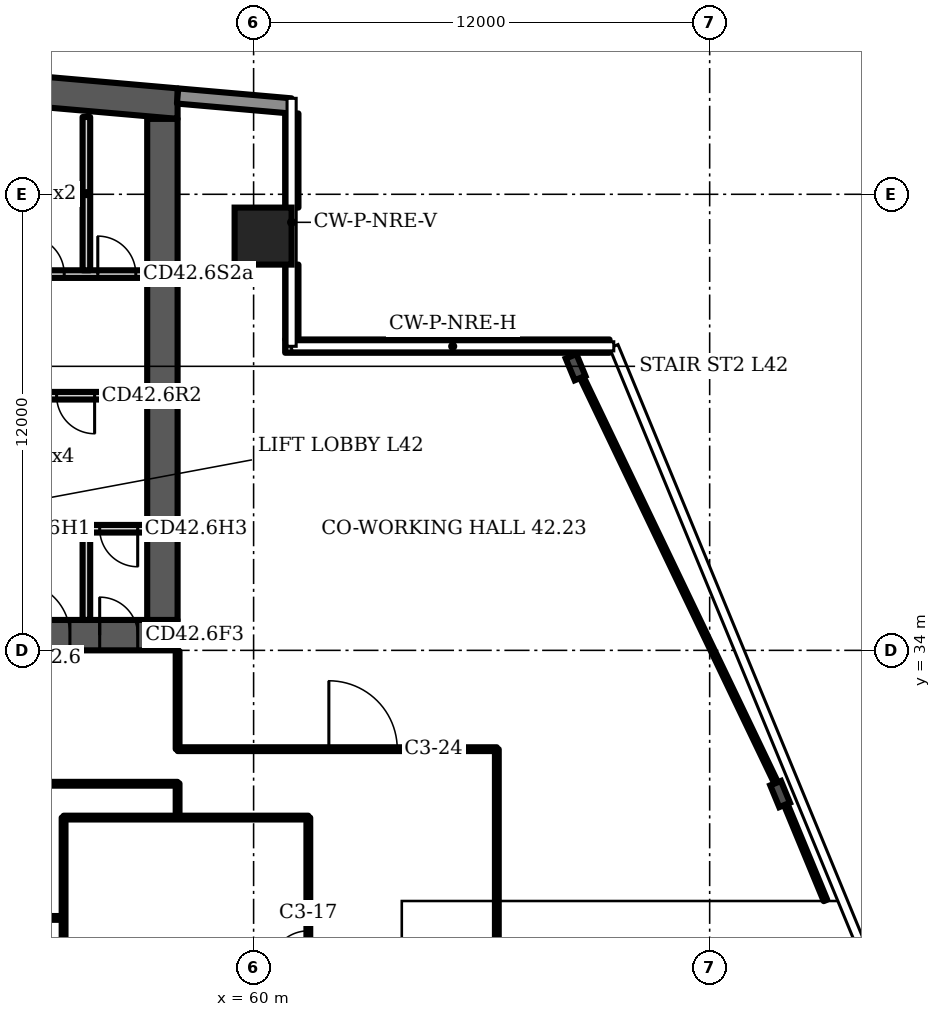
"""IFC4 building model, lengths in metres.
Left out: names, types, materials, properties, quantities, classifications, styles, units other than length and angle.
Written with IfcOpenShell. Run it as: python <this file> out.ifc"""

import sys

from ifc_helpers import new_model, si_unit, direction, frame, frame_2d, origin, origin_2d, place, context, subcontext, project, spatial, polyline, rectangle, i_section, outline, extrude, element, fill, save


model = new_model("IFC4")
c1 = context("Model", 3, precision=1e-05, world=origin(), true_north=direction((0.0, 1.0)))
c2 = subcontext(c1, "Body", "Model", "MODEL_VIEW")
j1 = project(units=[si_unit("LENGTHUNIT", "METRE"), si_unit("PLANEANGLEUNIT", "RADIAN")], contexts=[c1])
p1 = place(None, origin())
s1 = spatial("IfcSite", under=j1, at=p1, CompositionType="ELEMENT")
p2 = place(p1, origin())
s2 = spatial("IfcBuilding", under=s1, at=p2, CompositionType="ELEMENT")
p3 = place(p2, frame((0.0, 0.0, 173.5)))
s3 = spatial("IfcBuildingStorey", under=s2, at=p3, CompositionType="ELEMENT", Elevation=173.5)
p4 = place(p3, origin())
e1 = element("IfcWall", 1, at=p4, inside=s3, PredefinedType="SHEAR", context=c2, shape_type="SweptSolid", body=[
    extrude(outline(polyline([(16.0, 47.984), (37.0, 49.822), (58.0, 47.984), (58.0, 48.787), (37.0, 50.625), (16.0, 48.787), (16.0, 47.984)])), origin(), (0.0, 0.0, 1.0), 3.6),
])
p5 = place(p3, frame((16.0, 34.4, 0.0), z_axis=(0.0, 0.0, 1.0), x_axis=(1.0, 0.0, 0.0)))
e2 = element("IfcWall", 2, at=p5, inside=s3, PredefinedType="SHEAR", context=c2, shape_type="SweptSolid", body=[
    extrude(rectangle(XDim=42.0, YDim=0.8, at=frame_2d((21.0, 0.0))), origin(), (0.0, 0.0, 1.0), 3.6),
])
p6 = place(p5, frame((3.2, 0.0, 0.0)))
e3 = element("IfcOpeningElement", 3, at=p6, cuts=e2, PredefinedType="OPENING", context=c2, shape_type="SweptSolid", body=[
    extrude(rectangle(XDim=1.0, YDim=2.1, at=frame_2d((0.5, 1.05))), frame((0.0, 0.41, 0.0), z_axis=(0.0, -1.0, 0.0), x_axis=(1.0, 0.0, 0.0)), (0.0, 0.0, 1.0), 0.82),
])
p7 = place(p5, frame((7.65, 0.0, 0.0)))
e4 = element("IfcOpeningElement", 4, at=p7, cuts=e2, PredefinedType="OPENING", context=c2, shape_type="SweptSolid", body=[
    extrude(rectangle(XDim=1.2, YDim=2.1, at=frame_2d((0.6, 1.05))), frame((0.0, 0.41, 0.0), z_axis=(0.0, -1.0, 0.0), x_axis=(1.0, 0.0, 0.0)), (0.0, 0.0, 1.0), 0.82),
])
p8 = place(p5, frame((14.767, 0.0, 0.0)))
e5 = element("IfcOpeningElement", 5, at=p8, cuts=e2, PredefinedType="OPENING", context=c2, shape_type="SweptSolid", body=[
    extrude(rectangle(XDim=1.1, YDim=2.1, at=frame_2d((0.55, 1.05))), frame((0.0, 0.41, 0.0), z_axis=(0.0, -1.0, 0.0), x_axis=(1.0, 0.0, 0.0)), (0.0, 0.0, 1.0), 0.82),
])
p9 = place(p5, frame((19.133, 0.0, 0.0)))
e6 = element("IfcOpeningElement", 6, at=p9, cuts=e2, PredefinedType="OPENING", context=c2, shape_type="SweptSolid", body=[
    extrude(rectangle(XDim=1.1, YDim=2.1, at=frame_2d((0.55, 1.05))), frame((0.0, 0.41, 0.0), z_axis=(0.0, -1.0, 0.0), x_axis=(1.0, 0.0, 0.0)), (0.0, 0.0, 1.0), 0.82),
])
p10 = place(p5, frame((16.8, 0.0, 0.0)))
e7 = element("IfcOpeningElement", 7, at=p10, cuts=e2, PredefinedType="OPENING", context=c2, shape_type="SweptSolid", body=[
    extrude(rectangle(XDim=1.4, YDim=2.1, at=frame_2d((0.7, 1.05))), frame((0.0, 0.41, 0.0), z_axis=(0.0, -1.0, 0.0), x_axis=(1.0, 0.0, 0.0)), (0.0, 0.0, 1.0), 0.82),
])
p11 = place(p5, frame((21.767, 0.0, 0.0)))
e8 = element("IfcOpeningElement", 8, at=p11, cuts=e2, PredefinedType="OPENING", context=c2, shape_type="SweptSolid", body=[
    extrude(rectangle(XDim=1.1, YDim=2.1, at=frame_2d((0.55, 1.05))), frame((0.0, 0.41, 0.0), z_axis=(0.0, -1.0, 0.0), x_axis=(1.0, 0.0, 0.0)), (0.0, 0.0, 1.0), 0.82),
])
p12 = place(p5, frame((23.95, 0.0, 0.0)))
e9 = element("IfcOpeningElement", 9, at=p12, cuts=e2, PredefinedType="OPENING", context=c2, shape_type="SweptSolid", body=[
    extrude(rectangle(XDim=1.1, YDim=2.1, at=frame_2d((0.55, 1.05))), frame((0.0, 0.41, 0.0), z_axis=(0.0, -1.0, 0.0), x_axis=(1.0, 0.0, 0.0)), (0.0, 0.0, 1.0), 0.82),
])
p13 = place(p5, frame((26.133, 0.0, 0.0)))
e10 = element("IfcOpeningElement", 10, at=p13, cuts=e2, PredefinedType="OPENING", context=c2, shape_type="SweptSolid", body=[
    extrude(rectangle(XDim=1.1, YDim=2.1, at=frame_2d((0.55, 1.05))), frame((0.0, 0.41, 0.0), z_axis=(0.0, -1.0, 0.0), x_axis=(1.0, 0.0, 0.0)), (0.0, 0.0, 1.0), 0.82),
])
p14 = place(p5, frame((33.15, 0.0, 0.0)))
e11 = element("IfcOpeningElement", 11, at=p14, cuts=e2, PredefinedType="OPENING", context=c2, shape_type="SweptSolid", body=[
    extrude(rectangle(XDim=1.2, YDim=2.1, at=frame_2d((0.6, 1.05))), frame((0.0, 0.41, 0.0), z_axis=(0.0, -1.0, 0.0), x_axis=(1.0, 0.0, 0.0)), (0.0, 0.0, 1.0), 0.82),
])
p15 = place(p5, frame((35.817, 0.0, 0.0)))
e12 = element("IfcOpeningElement", 12, at=p15, cuts=e2, PredefinedType="OPENING", context=c2, shape_type="SweptSolid", body=[
    extrude(rectangle(XDim=1.0, YDim=2.1, at=frame_2d((0.5, 1.05))), frame((0.0, 0.41, 0.0), z_axis=(0.0, -1.0, 0.0), x_axis=(1.0, 0.0, 0.0)), (0.0, 0.0, 1.0), 0.82),
])
p16 = place(p5, frame((39.95, 0.0, 0.0)))
e13 = element("IfcOpeningElement", 13, at=p16, cuts=e2, PredefinedType="OPENING", context=c2, shape_type="SweptSolid", body=[
    extrude(rectangle(XDim=1.0, YDim=2.1, at=frame_2d((0.5, 1.05))), frame((0.0, 0.41, 0.0), z_axis=(0.0, -1.0, 0.0), x_axis=(1.0, 0.0, 0.0)), (0.0, 0.0, 1.0), 0.82),
])
p17 = place(p5, frame((37.767, 0.0, 0.0)))
e14 = element("IfcOpeningElement", 14, at=p17, cuts=e2, PredefinedType="OPENING", context=c2, shape_type="SweptSolid", body=[
    extrude(rectangle(XDim=1.4, YDim=2.1, at=frame_2d((0.7, 1.05))), frame((0.0, 0.41, 0.0), z_axis=(0.0, -1.0, 0.0), x_axis=(1.0, 0.0, 0.0)), (0.0, 0.0, 1.0), 0.82),
])
p18 = place(p3, frame((57.6, 34.8, 0.0), z_axis=(0.0, 0.0, 1.0), x_axis=(0.0, 1.0, 0.0)))
e15 = element("IfcWall", 15, at=p18, inside=s3, PredefinedType="SHEAR", context=c2, shape_type="SweptSolid", body=[
    extrude(rectangle(XDim=13.184, YDim=0.8, at=frame_2d((6.592, 0.0))), origin(), (0.0, 0.0, 1.0), 3.6),
])
p19 = place(p3, frame((60.25, 44.9, 0.0), z_axis=(0.0, 0.0, 1.0), x_axis=(1.0, 0.0, 0.0)))
e16 = element("IfcColumn", 16, at=p19, inside=s3, PredefinedType="COLUMN", context=c2, shape_type="SweptSolid", body=[
    extrude(rectangle(XDim=1.5, YDim=1.5, at=origin_2d()), origin(), (0.0, 0.0, 1.0), 3.6),
])
for number, where, z_axis, x_axis in (
    (17, (73.854, 30.219, 0.0), (0.0, 0.0, 1.0), (0.924, 0.382, 0.0)),
    (18, (68.472, 41.45, 0.0), (0.0, 0.0, 1.0), (0.924, 0.382, 0.0)),
):
    element("IfcColumn", number, at=place(p3, frame(where, z_axis=z_axis, x_axis=x_axis)), inside=s3, PredefinedType="COLUMN", context=c2, shape_type="SweptSolid", body=[
        extrude(i_section(OverallWidth=0.305, OverallDepth=0.62, WebThickness=0.021, FlangeThickness=0.04, FilletRadius=0.027, at=origin_2d()), origin(), (0.0, 0.0, 1.0), 3.6),
    ])
p20 = place(p3, frame((60.983, 48.326, 0.0), z_axis=(0.0, 0.0, 1.0), x_axis=(-0.996194, 0.087168, 0.0)))
e19 = element("IfcWall", 19, at=p20, inside=s3, PredefinedType="SOLIDWALL", context=c2, shape_type="SweptSolid", body=[
    extrude(rectangle(XDim=2.994, YDim=0.4, at=frame_2d((1.497, 0.0))), origin(), (0.0, 0.0, 1.0), 3.2),
])
p21 = place(p3, frame((69.366, 42.005, 0.0), z_axis=(0.0, 0.0, 1.0), x_axis=(-1.0, 0.0, 0.0)))
e20 = element("IfcWall", 20, at=p21, inside=s3, PredefinedType="SOLIDWALL", context=c2, shape_type="SweptSolid", body=[
    extrude(rectangle(XDim=8.536, YDim=0.35, at=frame_2d((4.268, 0.0))), origin(), (0.0, 0.0, 1.0), 1.0),
])
p22 = place(p3, frame((61.005, 42.18, 0.0), z_axis=(0.0, 0.0, 1.0), x_axis=(0.0, 1.0, 0.0)))
e21 = element("IfcWall", 21, at=p22, inside=s3, PredefinedType="SOLIDWALL", context=c2, shape_type="SweptSolid", body=[
    extrude(rectangle(XDim=1.97, YDim=0.35, at=frame_2d((0.985, 0.0))), origin(), (0.0, 0.0, 1.0), 1.0),
])
p23 = place(p3, frame((61.005, 45.65, 0.0), z_axis=(0.0, 0.0, 1.0), x_axis=(0.0, 1.0, 0.0)))
e22 = element("IfcWall", 22, at=p23, inside=s3, PredefinedType="SOLIDWALL", context=c2, shape_type="SweptSolid", body=[
    extrude(rectangle(XDim=2.477, YDim=0.35, at=frame_2d((1.238, 0.0))), origin(), (0.0, 0.0, 1.0), 1.0),
])
p24 = place(p3, frame((55.7, 37.2, 0.0), z_axis=(0.0, 0.0, 1.0), x_axis=(1.0, 0.0, 0.0)))
e23 = element("IfcWall", 23, at=p24, inside=s3, PredefinedType="PARTITIONING", context=c2, shape_type="SweptSolid", body=[
    extrude(rectangle(XDim=1.5, YDim=0.2, at=frame_2d((0.75, 0.0))), origin(), (0.0, 0.0, 1.0), 3.2),
])
p25 = place(p24, frame((0.25, 0.0, 0.0)))
e24 = element("IfcOpeningElement", 24, at=p25, cuts=e23, PredefinedType="OPENING", context=c2, shape_type="SweptSolid", body=[
    extrude(rectangle(XDim=1.0, YDim=2.1, at=frame_2d((0.5, 1.05))), frame((0.0, 0.11, 0.0), z_axis=(0.0, -1.0, 0.0), x_axis=(1.0, 0.0, 0.0)), (0.0, 0.0, 1.0), 0.22),
])
p26 = place(p3, frame((51.4, 40.7, 0.0), z_axis=(0.0, 0.0, 1.0), x_axis=(1.0, 0.0, 0.0)))
e25 = element("IfcWall", 25, at=p26, inside=s3, PredefinedType="PARTITIONING", context=c2, shape_type="SweptSolid", body=[
    extrude(rectangle(XDim=5.8, YDim=0.2, at=frame_2d((2.9, 0.0))), origin(), (0.0, 0.0, 1.0), 3.2),
])
p27 = place(p26, frame((0.367, 0.0, 0.0)))
e26 = element("IfcOpeningElement", 26, at=p27, cuts=e25, PredefinedType="OPENING", context=c2, shape_type="SweptSolid", body=[
    extrude(rectangle(XDim=1.1, YDim=2.1, at=frame_2d((0.55, 1.05))), frame((0.0, 0.11, 0.0), z_axis=(0.0, -1.0, 0.0), x_axis=(1.0, 0.0, 0.0)), (0.0, 0.0, 1.0), 0.22),
])
p28 = place(p26, frame((3.417, 0.0, 0.0)))
e27 = element("IfcOpeningElement", 27, at=p28, cuts=e25, PredefinedType="OPENING", context=c2, shape_type="SweptSolid", body=[
    extrude(rectangle(XDim=1.0, YDim=2.1, at=frame_2d((0.5, 1.05))), frame((0.0, 0.11, 0.0), z_axis=(0.0, -1.0, 0.0), x_axis=(1.0, 0.0, 0.0)), (0.0, 0.0, 1.0), 0.22),
])
p29 = place(p3, frame((51.4, 43.9, 0.0), z_axis=(0.0, 0.0, 1.0), x_axis=(1.0, 0.0, 0.0)))
e28 = element("IfcWall", 28, at=p29, inside=s3, PredefinedType="PARTITIONING", context=c2, shape_type="SweptSolid", body=[
    extrude(rectangle(XDim=5.8, YDim=0.2, at=frame_2d((2.9, 0.0))), origin(), (0.0, 0.0, 1.0), 3.2),
])
p30 = place(p29, frame((2.617, 0.0, 0.0)))
e29 = element("IfcOpeningElement", 29, at=p30, cuts=e28, PredefinedType="OPENING", context=c2, shape_type="SweptSolid", body=[
    extrude(rectangle(XDim=1.0, YDim=2.1, at=frame_2d((0.5, 1.05))), frame((0.0, 0.11, 0.0), z_axis=(0.0, -1.0, 0.0), x_axis=(1.0, 0.0, 0.0)), (0.0, 0.0, 1.0), 0.22),
])
p31 = place(p29, frame((4.5, 0.0, 0.0)))
e30 = element("IfcOpeningElement", 30, at=p31, cuts=e28, PredefinedType="OPENING", context=c2, shape_type="SweptSolid", body=[
    extrude(rectangle(XDim=1.0, YDim=2.1, at=frame_2d((0.5, 1.05))), frame((0.0, 0.11, 0.0), z_axis=(0.0, -1.0, 0.0), x_axis=(1.0, 0.0, 0.0)), (0.0, 0.0, 1.0), 0.22),
])
p32 = place(p3, frame((0.0, 0.0, -0.0)))
e31 = element("IfcWall", 31, at=p32, inside=s3, PredefinedType="PARTITIONING", context=c2, shape_type="SweptSolid", body=[
    extrude(outline(polyline([(55.5, 34.8), (55.5, 37.3), (55.7, 37.3), (55.7, 34.8), (55.5, 34.8)])), origin(), (0.0, 0.0, 1.0), 3.2),
])
p33 = place(p3, frame((55.6, 44.0, 0.0), z_axis=(0.0, 0.0, 1.0), x_axis=(0.0, 1.0, 0.0)))
e32 = element("IfcWall", 32, at=p33, inside=s3, PredefinedType="PARTITIONING", context=c2, shape_type="SweptSolid", body=[
    extrude(rectangle(XDim=4.034, YDim=0.2, at=frame_2d((2.017, 0.0))), origin(), (0.0, 0.0, 1.0), 3.2),
])
p34 = place(p3, frame((46.91, 30.49, 0.0), z_axis=(0.0, 0.0, 1.0), x_axis=(1.0, 0.0, 0.0)))
e33 = element("IfcWall", 33, at=p34, inside=s3, PredefinedType="PARTITIONING", context=c2, shape_type="SweptSolid", body=[
    extrude(rectangle(XDim=11.09, YDim=0.1, at=frame_2d((5.545, 0.0))), origin(), (0.0, 0.0, 1.0), 3.2),
])
p35 = place(p34, frame((0.235, 0.0, 0.0)))
e34 = element("IfcOpeningElement", 34, at=p35, cuts=e33, PredefinedType="OPENING", context=c2, shape_type="SweptSolid", body=[
    extrude(rectangle(XDim=1.1, YDim=2.1, at=frame_2d((0.55, 1.05))), frame((0.0, 0.06, 0.0), z_axis=(0.0, -1.0, 0.0), x_axis=(1.0, 0.0, 0.0)), (0.0, 0.0, 1.0), 0.12),
])
p36 = place(p3, frame((48.7, 26.96, 0.0), z_axis=(0.0, 0.0, 1.0), x_axis=(1.0, 0.0, 0.0)))
e35 = element("IfcWall", 35, at=p36, inside=s3, PredefinedType="PARTITIONING", context=c2, shape_type="SweptSolid", body=[
    extrude(rectangle(XDim=6.3, YDim=0.1, at=frame_2d((3.15, 0.0))), origin(), (0.0, 0.0, 1.0), 3.2),
])
p37 = place(p3, frame((55.0, 15.745, 0.0), z_axis=(0.0, 0.0, 1.0), x_axis=(0.0, 1.0, 0.0)))
e36 = element("IfcWall", 36, at=p37, inside=s3, PredefinedType="PARTITIONING", context=c2, shape_type="SweptSolid", body=[
    extrude(rectangle(XDim=13.855, YDim=0.1, at=frame_2d((6.927, 0.0))), origin(), (0.0, 0.0, 1.0), 3.2),
])
p38 = place(p3, frame((55.0, 29.6, 0.0), z_axis=(0.0, 0.0, 1.0), x_axis=(1.0, 0.0, 0.0)))
e37 = element("IfcWall", 37, at=p38, inside=s3, PredefinedType="PARTITIONING", context=c2, shape_type="SweptSolid", body=[
    extrude(rectangle(XDim=6.44, YDim=0.1, at=frame_2d((3.22, 0.0))), origin(), (0.0, 0.0, 1.0), 3.2),
])
p39 = place(p3, frame((58.0, 29.6, 0.0), z_axis=(0.0, 0.0, 1.0), x_axis=(0.0, 1.0, 0.0)))
e38 = element("IfcWall", 38, at=p39, inside=s3, PredefinedType="PARTITIONING", context=c2, shape_type="SweptSolid", body=[
    extrude(rectangle(XDim=0.9, YDim=0.1, at=frame_2d((0.45, 0.0))), origin(), (0.0, 0.0, 1.0), 3.2),
])
p40 = place(p3, frame((58.0, 31.4, 0.0), z_axis=(0.0, 0.0, 1.0), x_axis=(0.0, 1.0, 0.0)))
e39 = element("IfcWall", 39, at=p40, inside=s3, PredefinedType="PARTITIONING", context=c2, shape_type="SweptSolid", body=[
    extrude(rectangle(XDim=2.58, YDim=0.1, at=frame_2d((1.29, 0.0))), origin(), (0.0, 0.0, 1.0), 3.2),
])
p41 = place(p3, frame((58.0, 31.4, 0.0), z_axis=(0.0, 0.0, 1.0), x_axis=(1.0, 0.0, 0.0)))
e40 = element("IfcWall", 40, at=p41, inside=s3, PredefinedType="PARTITIONING", context=c2, shape_type="SweptSolid", body=[
    extrude(rectangle(XDim=8.4, YDim=0.1, at=frame_2d((4.2, 0.0))), origin(), (0.0, 0.0, 1.0), 3.2),
])
p42 = place(p41, frame((3.98, 0.0, 0.0)))
e41 = element("IfcOpeningElement", 41, at=p42, cuts=e40, PredefinedType="OPENING", context=c2, shape_type="SweptSolid", body=[
    extrude(rectangle(XDim=1.8, YDim=2.1, at=frame_2d((0.9, 1.05))), frame((0.0, 0.06, 0.0), z_axis=(0.0, -1.0, 0.0), x_axis=(1.0, 0.0, 0.0)), (0.0, 0.0, 1.0), 0.12),
])
p43 = place(p3, frame((61.44, 24.8, 0.0), z_axis=(0.0, 0.0, 1.0), x_axis=(0.0, 1.0, 0.0)))
e42 = element("IfcWall", 42, at=p43, inside=s3, PredefinedType="PARTITIONING", context=c2, shape_type="SweptSolid", body=[
    extrude(rectangle(XDim=4.8, YDim=0.1, at=frame_2d((2.4, 0.0))), origin(), (0.0, 0.0, 1.0), 3.2),
])
p44 = place(p43, frame((0.82, 0.0, 0.0)))
e43 = element("IfcOpeningElement", 43, at=p44, cuts=e42, PredefinedType="OPENING", context=c2, shape_type="SweptSolid", body=[
    extrude(rectangle(XDim=1.0, YDim=2.1, at=frame_2d((0.5, 1.05))), frame((0.0, 0.06, 0.0), z_axis=(0.0, -1.0, 0.0), x_axis=(1.0, 0.0, 0.0)), (0.0, 0.0, 1.0), 0.12),
])
p45 = place(p3, frame((66.4, 26.075, 0.0), z_axis=(0.0, 0.0, 1.0), x_axis=(0.0, 1.0, 0.0)))
e44 = element("IfcWall", 44, at=p45, inside=s3, PredefinedType="PARTITIONING", context=c2, shape_type="SweptSolid", body=[
    extrude(rectangle(XDim=5.325, YDim=0.1, at=frame_2d((2.663, 0.0))), origin(), (0.0, 0.0, 1.0), 3.2),
])
p46 = place(p3, frame((73.885, 30.23, 0.0), z_axis=(0.0, 0.0, 1.0), x_axis=(-0.432129, 0.901808, 0.0)))
e45 = element("IfcWall", 45, at=p46, inside=s3, PredefinedType="PARTITIONING", context=c2, shape_type="SweptSolid", body=[
    extrude(rectangle(XDim=13.029, YDim=0.1, at=frame_2d((6.515, 0.0))), origin(), (0.0, 0.0, 1.0), 2.58),
])
p47 = place(p3, frame((75.047, 27.42, 0.0), z_axis=(0.0, 0.0, 1.0), x_axis=(-0.382024, 0.924148, 0.0)))
e46 = element("IfcWall", 46, at=p47, inside=s3, PredefinedType="PARTITIONING", context=c2, shape_type="SweptSolid", body=[
    extrude(rectangle(XDim=3.041, YDim=0.1, at=frame_2d((1.521, 0.0))), origin(), (0.0, 0.0, 1.0), 2.58),
])
p48 = place(p16, origin())
e47 = element("IfcDoor", 47, at=p48, inside=s3, OperationType="SINGLE_SWING_LEFT", PredefinedType="DOOR", context=c2, shape_type="SweptSolid", body=[
    extrude(rectangle(XDim=1.0, YDim=2.1, at=frame_2d((0.5, 1.05))), frame((0.0, 0.4, 0.0), z_axis=(0.0, -1.0, 0.0), x_axis=(1.0, 0.0, 0.0)), (0.0, 0.0, 1.0), 0.8),
])
fill(e13, e47)
p49 = place(p25, origin())
e48 = element("IfcDoor", 48, at=p49, inside=s3, OperationType="SINGLE_SWING_RIGHT", PredefinedType="DOOR", context=c2, shape_type="SweptSolid", body=[
    extrude(rectangle(XDim=1.0, YDim=2.1, at=frame_2d((0.5, 1.05))), frame((0.0, 0.025, 0.0), z_axis=(0.0, -1.0, 0.0), x_axis=(1.0, 0.0, 0.0)), (0.0, 0.0, 1.0), 0.05),
])
fill(e24, e48)
p50 = place(p17, origin())
e49 = element("IfcDoor", 49, at=p50, inside=s3, OperationType="DOUBLE_DOOR_SINGLE_SWING", PredefinedType="DOOR", context=c2, shape_type="SweptSolid", body=[
    extrude(rectangle(XDim=1.4, YDim=2.1, at=frame_2d((0.7, 1.05))), frame((0.0, 0.025, 0.0), z_axis=(0.0, -1.0, 0.0), x_axis=(1.0, 0.0, 0.0)), (0.0, 0.0, 1.0), 0.05),
])
fill(e14, e49)
p51 = place(p28, origin())
e50 = element("IfcDoor", 50, at=p51, inside=s3, OperationType="SINGLE_SWING_RIGHT", PredefinedType="DOOR", context=c2, shape_type="SweptSolid", body=[
    extrude(rectangle(XDim=1.0, YDim=2.1, at=frame_2d((0.5, 1.05))), frame((0.0, 0.025, 0.0), z_axis=(0.0, -1.0, 0.0), x_axis=(1.0, 0.0, 0.0)), (0.0, 0.0, 1.0), 0.05),
])
fill(e27, e50)
p52 = place(p30, origin())
e51 = element("IfcDoor", 51, at=p52, inside=s3, OperationType="SINGLE_SWING_LEFT", PredefinedType="DOOR", context=c2, shape_type="SweptSolid", body=[
    extrude(rectangle(XDim=1.0, YDim=2.1, at=frame_2d((0.5, 1.05))), frame((0.0, 0.025, 0.0), z_axis=(0.0, -1.0, 0.0), x_axis=(1.0, 0.0, 0.0)), (0.0, 0.0, 1.0), 0.05),
])
fill(e29, e51)
p53 = place(p31, origin())
e52 = element("IfcDoor", 52, at=p53, inside=s3, OperationType="SINGLE_SWING_LEFT", PredefinedType="DOOR", context=c2, shape_type="SweptSolid", body=[
    extrude(rectangle(XDim=1.0, YDim=2.1, at=frame_2d((0.5, 1.05))), frame((0.0, 0.025, 0.0), z_axis=(0.0, -1.0, 0.0), x_axis=(1.0, 0.0, 0.0)), (0.0, 0.0, 1.0), 0.05),
])
fill(e30, e52)
p54 = place(p44, origin())
e53 = element("IfcDoor", 53, at=p54, inside=s3, OperationType="SINGLE_SWING_LEFT", PredefinedType="DOOR", context=c2, shape_type="SweptSolid", body=[
    extrude(rectangle(XDim=1.0, YDim=2.1, at=frame_2d((0.5, 1.05))), frame((0.0, 0.025, 0.0), z_axis=(0.0, -1.0, 0.0), x_axis=(1.0, 0.0, 0.0)), (0.0, 0.0, 1.0), 0.05),
])
fill(e43, e53)
p55 = place(p42, origin())
e54 = element("IfcDoor", 54, at=p55, inside=s3, OperationType="DOUBLE_DOOR_SINGLE_SWING", PredefinedType="DOOR", context=c2, shape_type="SweptSolid", body=[
    extrude(rectangle(XDim=1.8, YDim=2.1, at=frame_2d((0.9, 1.05))), frame((0.0, 0.025, 0.0), z_axis=(0.0, -1.0, 0.0), x_axis=(1.0, 0.0, 0.0)), (0.0, 0.0, 1.0), 0.05),
])
fill(e41, e54)
save(model, sys.argv[1])
